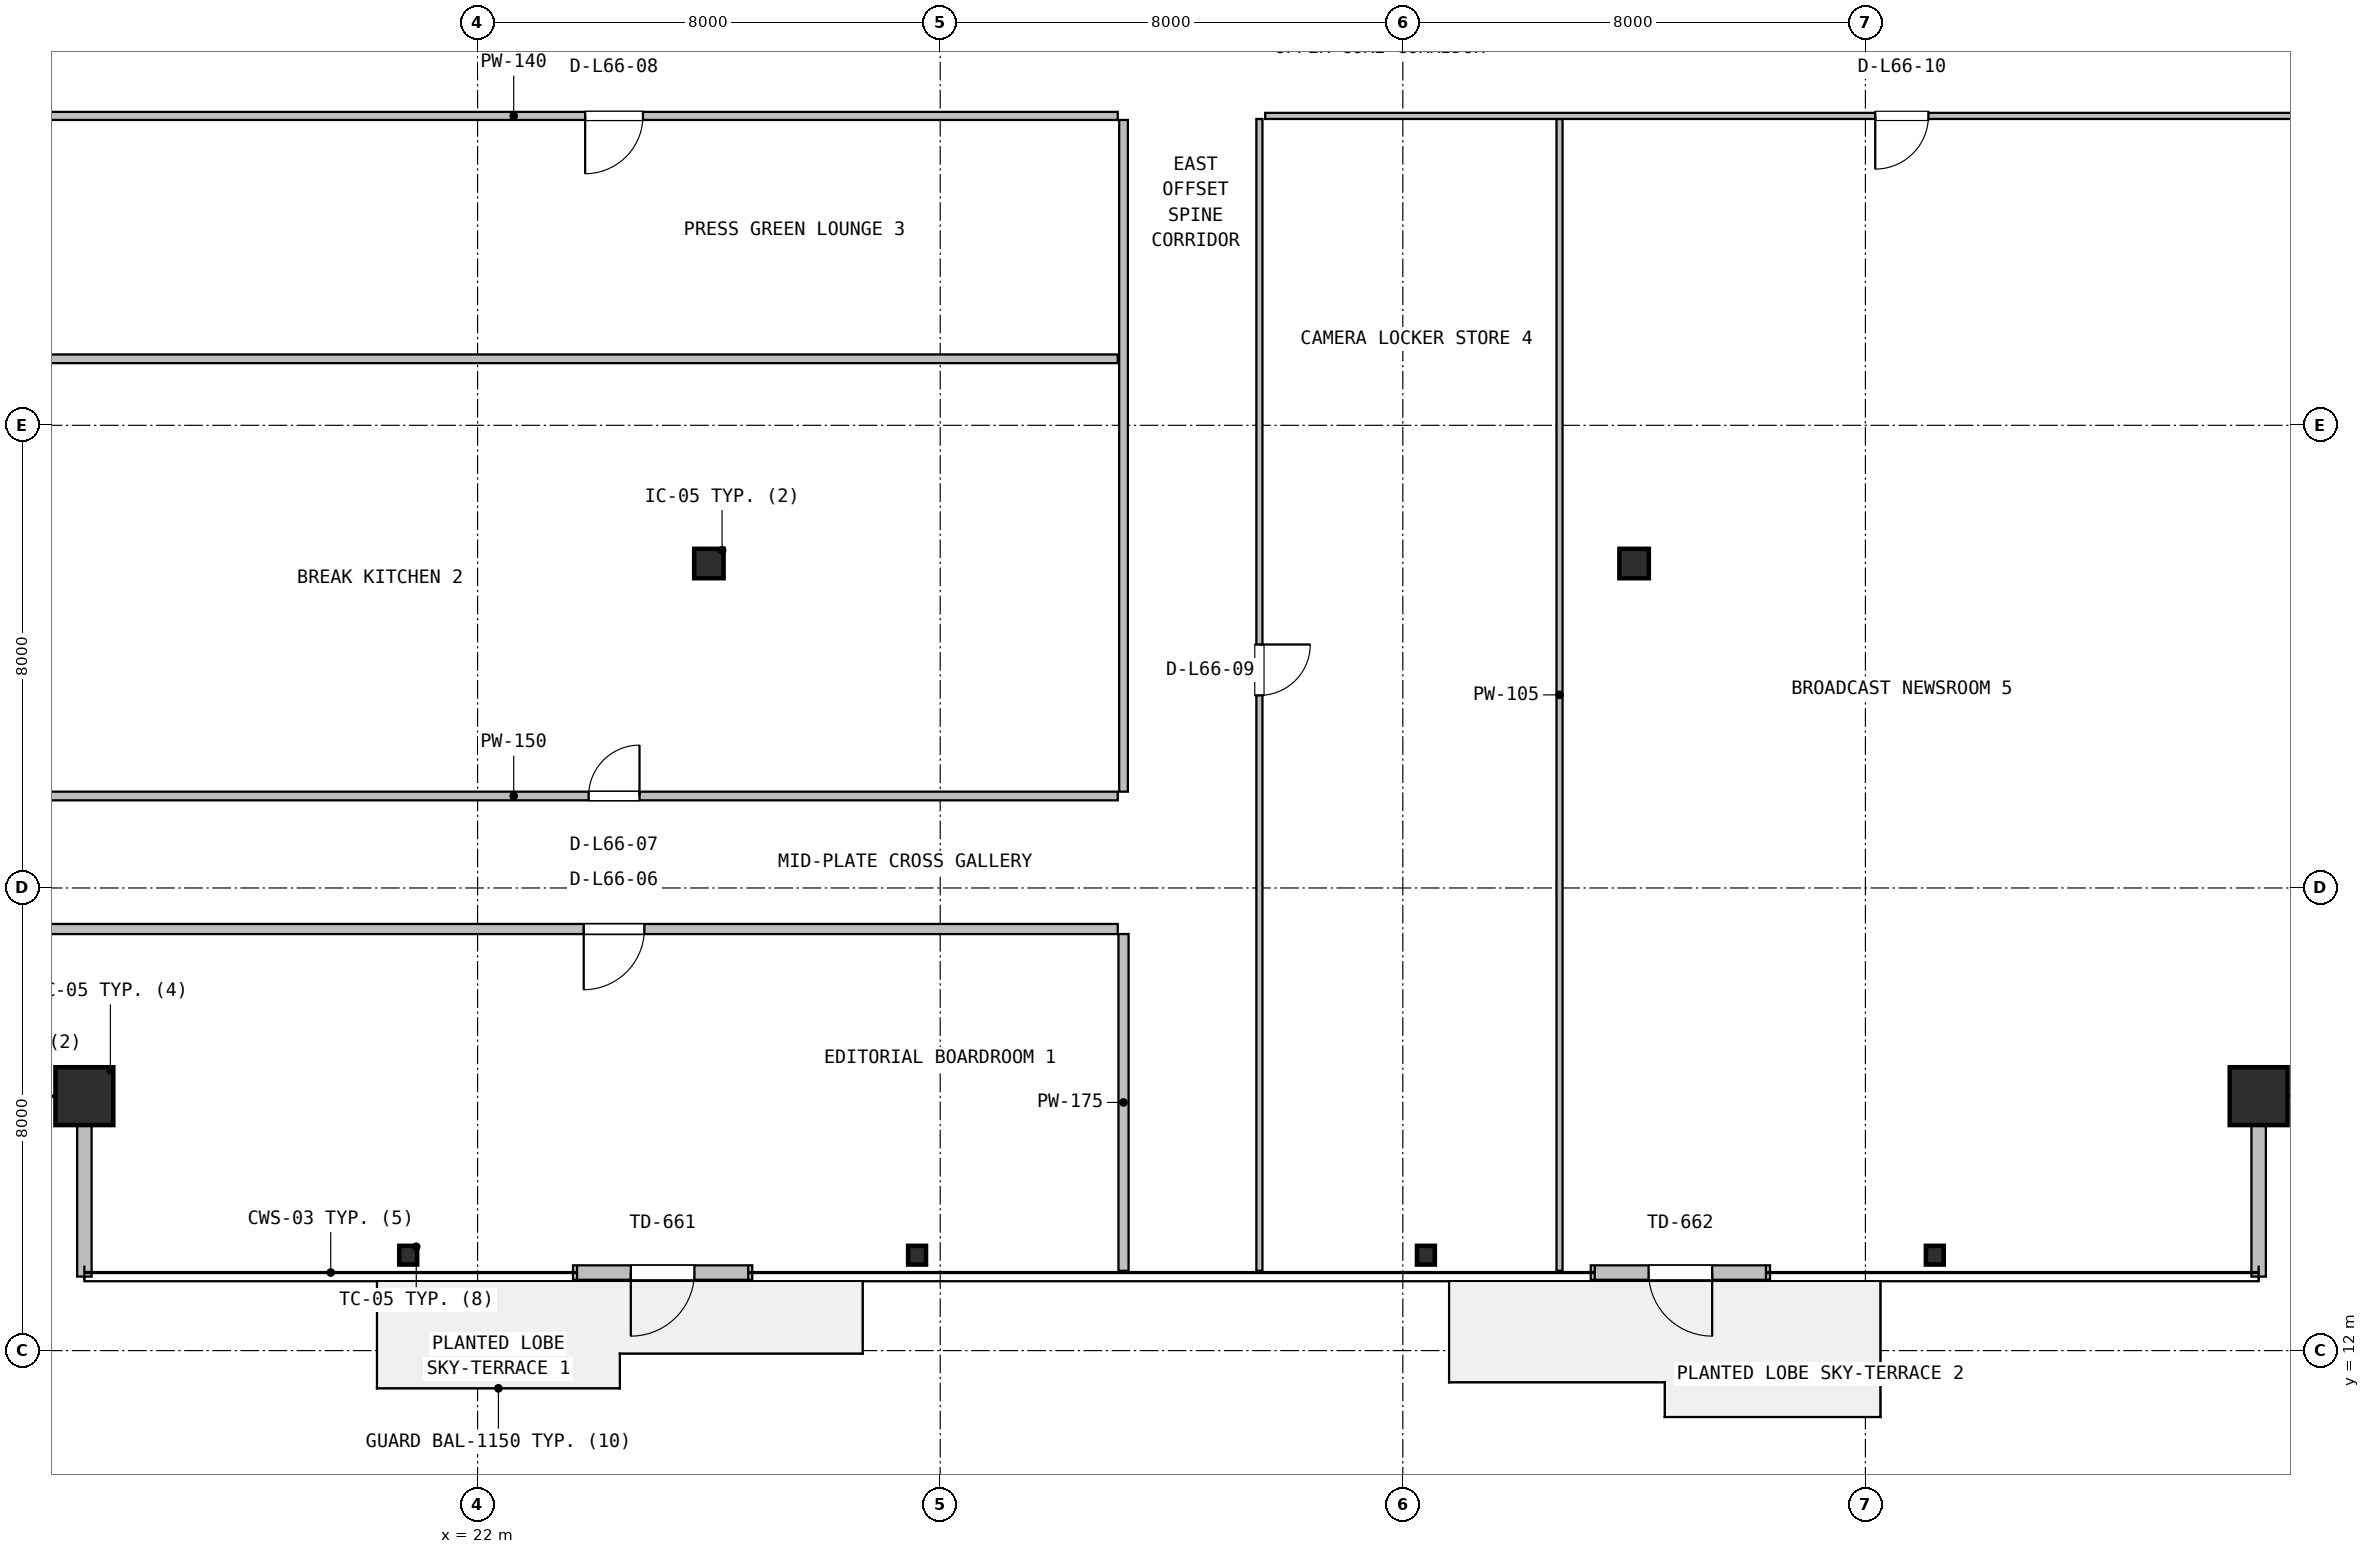
"""IFC4 building model, lengths in metres.
Left out: names, types, materials, properties, quantities, classifications, styles, units other than length and angle.
Written with IfcOpenShell. Run it as: python <this file> out.ifc"""

import sys

from ifc_helpers import new_model, si_unit, direction, frame, frame_2d, origin, origin_2d, place, context, subcontext, project, spatial, rectangle, hollow_rectangle, hollow_circle, i_section, extrude, source, transform, mapped, element, fill, save


model = new_model("IFC4")
c1 = context("Model", 3, precision=1e-05, world=origin(), true_north=direction((0.0, 1.0)))
c2 = subcontext(c1, "Body", "Model", "MODEL_VIEW")
j1 = project(units=[si_unit("LENGTHUNIT", "METRE"), si_unit("PLANEANGLEUNIT", "RADIAN")], contexts=[c1])
p1 = place(None, origin())
s1 = spatial("IfcSite", under=j1, at=p1, CompositionType="ELEMENT")
p2 = place(p1, origin())
s2 = spatial("IfcBuilding", under=s1, at=p2, CompositionType="ELEMENT")
p3 = place(p2, frame((0.0, 0.0, 266.0)))
s3 = spatial("IfcBuildingStorey", under=s2, at=p3, CompositionType="ELEMENT", Elevation=266.0)
m1 = source(origin(), c2, "Body", "SweptSolid", [
    extrude(hollow_rectangle(XDim=1.0, YDim=1.0, WallThickness=0.04, at=origin_2d()), origin(), (0.0, 0.0, 1.0), 3.8),
])
for number, where, z_axis, x_axis in (
    (1, (15.2, 16.4, 0.0), (0.0, 0.0, 1.0), (1.0, 0.0, 0.0)),
    (2, (52.8, 16.4, 0.0), (0.0, 0.0, 1.0), (1.0, 0.0, 0.0)),
):
    element("IfcColumn", number, at=place(p3, frame(where, z_axis=z_axis, x_axis=x_axis)), inside=s3, PredefinedType="COLUMN", context=c2, shape_type="MappedRepresentation", body=[
        mapped(m1, transform((0.0, 0.0, 0.0), x_axis=(1.0, 0.0, 0.0), y_axis=(0.0, 1.0, 0.0), z_axis=(0.0, 0.0, 1.0), scale=1.0)),
    ])
m2 = source(origin(), c2, "Body", "SweptSolid", [
    extrude(i_section(OverallWidth=0.309, OverallDepth=0.323, WebThickness=0.014, FlangeThickness=0.023, FilletRadius=0.015, at=origin_2d()), origin(), (0.0, 0.0, 1.0), 3.8),
])
for number, where, z_axis, x_axis in (
    (3, (20.8, 13.65, 0.0), (0.0, 0.0, 1.0), (1.0, 0.0, 0.0)),
    (4, (29.6, 13.65, 0.0), (0.0, 0.0, 1.0), (1.0, 0.0, 0.0)),
    (5, (38.4, 13.65, 0.0), (0.0, 0.0, 1.0), (1.0, 0.0, 0.0)),
    (6, (47.2, 13.65, 0.0), (0.0, 0.0, 1.0), (1.0, 0.0, 0.0)),
):
    element("IfcColumn", number, at=place(p3, frame(where, z_axis=z_axis, x_axis=x_axis)), inside=s3, PredefinedType="COLUMN", context=c2, shape_type="MappedRepresentation", body=[
        mapped(m2, transform((0.0, 0.0, 0.0), x_axis=(1.0, 0.0, 0.0), y_axis=(0.0, 1.0, 0.0), z_axis=(0.0, 0.0, 1.0), scale=1.0)),
    ])
m3 = source(origin(), c2, "Body", "SweptSolid", [
    extrude(hollow_circle(Radius=0.254, WallThickness=0.02, at=origin_2d()), origin(), (0.0, 0.0, 1.0), 3.8),
])
for number, where, z_axis, x_axis in (
    (7, (26.0, 25.61, 0.0), (0.0, 0.0, 1.0), (1.0, 0.0, 0.0)),
    (8, (42.0, 25.61, 0.0), (0.0, 0.0, 1.0), (1.0, 0.0, 0.0)),
):
    element("IfcColumn", number, at=place(p3, frame(where, z_axis=z_axis, x_axis=x_axis)), inside=s3, PredefinedType="COLUMN", context=c2, shape_type="MappedRepresentation", body=[
        mapped(m3, transform((0.0, 0.0, 0.0), x_axis=(1.0, 0.0, 0.0), y_axis=(0.0, 1.0, 0.0), z_axis=(0.0, 0.0, 1.0), scale=1.0)),
    ])
p4 = place(p3, frame((23.65, 13.35, 0.0), z_axis=(0.0, 0.0, 1.0), x_axis=(1.0, 0.0, 0.0)))
e9 = element("IfcWall", 9, at=p4, inside=s3, PredefinedType="SOLIDWALL", context=c2, shape_type="SweptSolid", body=[
    extrude(rectangle(XDim=3.1, YDim=0.25, at=frame_2d((1.55, 0.0))), origin(), (0.0, 0.0, 1.0), 3.53),
])
p5 = place(p4, frame((1.0, 0.0, 0.0)))
e10 = element("IfcOpeningElement", 10, at=p5, cuts=e9, PredefinedType="OPENING", context=c2, shape_type="SweptSolid", body=[
    extrude(rectangle(XDim=1.1, YDim=2.15, at=frame_2d((0.55, 1.075))), frame((0.0, 0.135, 0.0), z_axis=(0.0, -1.0, 0.0), x_axis=(1.0, 0.0, 0.0)), (0.0, 0.0, 1.0), 0.27),
])
p6 = place(p3, frame((41.25, 13.35, 0.0), z_axis=(0.0, 0.0, 1.0), x_axis=(1.0, 0.0, 0.0)))
e11 = element("IfcWall", 11, at=p6, inside=s3, PredefinedType="SOLIDWALL", context=c2, shape_type="SweptSolid", body=[
    extrude(rectangle(XDim=3.1, YDim=0.25, at=frame_2d((1.55, 0.0))), origin(), (0.0, 0.0, 1.0), 3.53),
])
p7 = place(p6, frame((1.0, 0.0, 0.0)))
e12 = element("IfcOpeningElement", 12, at=p7, cuts=e11, PredefinedType="OPENING", context=c2, shape_type="SweptSolid", body=[
    extrude(rectangle(XDim=1.1, YDim=2.15, at=frame_2d((0.55, 1.075))), frame((0.0, 0.135, 0.0), z_axis=(0.0, -1.0, 0.0), x_axis=(1.0, 0.0, 0.0)), (0.0, 0.0, 1.0), 0.27),
])
for number, where, z_axis, x_axis in (
    (13, (15.2, 13.28, 0.0), (0.0, 0.0, 1.0), (0.0, 1.0, 0.0)),
    (14, (52.8, 13.28, 0.0), (0.0, 0.0, 1.0), (0.0, 1.0, 0.0)),
):
    element("IfcWall", number, at=place(p3, frame(where, z_axis=z_axis, x_axis=x_axis)), inside=s3, PredefinedType="SOLIDWALL", context=c2, shape_type="SweptSolid", body=[
        extrude(rectangle(XDim=3.2, YDim=0.25, at=frame_2d((1.6, 0.0))), origin(), (0.0, 0.0, 1.0), 3.171),
    ])
p8 = place(p3, frame((33.17, 13.38, 0.0), z_axis=(0.0, 0.0, 1.0), x_axis=(0.0, 1.0, 0.0)))
e15 = element("IfcWall", 15, at=p8, inside=s3, PredefinedType="PARTITIONING", context=c2, shape_type="SweptSolid", body=[
    extrude(rectangle(XDim=5.823, YDim=0.175, at=frame_2d((2.912, 0.0))), origin(), (0.0, 0.0, 1.0), 3.171),
])
p9 = place(p3, frame((12.18, 19.29, 0.0), z_axis=(0.0, 0.0, 1.0), x_axis=(1.0, 0.0, 0.0)))
e16 = element("IfcWall", 16, at=p9, inside=s3, PredefinedType="PARTITIONING", context=c2, shape_type="SweptSolid", body=[
    extrude(rectangle(XDim=20.89, YDim=0.175, at=frame_2d((10.445, 0.0))), origin(), (0.0, 0.0, 1.0), 2.981),
])
p10 = place(p9, frame((11.655, 0.0, 0.0)))
e17 = element("IfcOpeningElement", 17, at=p10, cuts=e16, PredefinedType="OPENING", context=c2, shape_type="SweptSolid", body=[
    extrude(rectangle(XDim=1.05, YDim=2.1, at=frame_2d((0.525, 1.05))), frame((0.0, 0.098, 0.0), z_axis=(0.0, -1.0, 0.0), x_axis=(1.0, 0.0, 0.0)), (0.0, 0.0, 1.0), 0.195),
])
p11 = place(p3, frame((12.18, 21.59, 0.0), z_axis=(0.0, 0.0, 1.0), x_axis=(1.0, 0.0, 0.0)))
e18 = element("IfcWall", 18, at=p11, inside=s3, PredefinedType="PARTITIONING", context=c2, shape_type="SweptSolid", body=[
    extrude(rectangle(XDim=20.89, YDim=0.15, at=frame_2d((10.445, 0.0))), origin(), (0.0, 0.0, 1.0), 2.981),
])
p12 = place(p11, frame((11.74, 0.0, 0.0)))
e19 = element("IfcOpeningElement", 19, at=p12, cuts=e18, PredefinedType="OPENING", context=c2, shape_type="SweptSolid", body=[
    extrude(rectangle(XDim=0.88, YDim=2.06, at=frame_2d((0.44, 1.03))), frame((0.0, 0.085, 0.0), z_axis=(0.0, -1.0, 0.0), x_axis=(1.0, 0.0, 0.0)), (0.0, 0.0, 1.0), 0.17),
])
p13 = place(p3, frame((33.17, 21.665, 0.0), z_axis=(0.0, 0.0, 1.0), x_axis=(0.0, 1.0, 0.0)))
e20 = element("IfcWall", 20, at=p13, inside=s3, PredefinedType="PARTITIONING", context=c2, shape_type="SweptSolid", body=[
    extrude(rectangle(XDim=11.615, YDim=0.15, at=frame_2d((5.808, 0.0))), origin(), (0.0, 0.0, 1.0), 2.981),
])
p14 = place(p3, frame((12.18, 29.15, 0.0), z_axis=(0.0, 0.0, 1.0), x_axis=(1.0, 0.0, 0.0)))
e21 = element("IfcWall", 21, at=p14, inside=s3, PredefinedType="PARTITIONING", context=c2, shape_type="SweptSolid", body=[
    extrude(rectangle(XDim=20.89, YDim=0.15, at=frame_2d((10.445, 0.0))), origin(), (0.0, 0.0, 1.0), 2.981),
])
p15 = place(p3, frame((12.18, 33.35, 0.0), z_axis=(0.0, 0.0, 1.0), x_axis=(1.0, 0.0, 0.0)))
e22 = element("IfcWall", 22, at=p15, inside=s3, PredefinedType="PARTITIONING", context=c2, shape_type="SweptSolid", body=[
    extrude(rectangle(XDim=20.89, YDim=0.14, at=frame_2d((10.445, 0.0))), origin(), (0.0, 0.0, 1.0), 2.981),
])
p16 = place(p15, frame((11.68, 0.0, 0.0)))
e23 = element("IfcOpeningElement", 23, at=p16, cuts=e22, PredefinedType="OPENING", context=c2, shape_type="SweptSolid", body=[
    extrude(rectangle(XDim=1.0, YDim=2.1, at=frame_2d((0.5, 1.05))), frame((0.0, 0.08, 0.0), z_axis=(0.0, -1.0, 0.0), x_axis=(1.0, 0.0, 0.0)), (0.0, 0.0, 1.0), 0.16),
])
p17 = place(p3, frame((40.71, 13.38, 0.0), z_axis=(0.0, 0.0, 1.0), x_axis=(0.0, 1.0, 0.0)))
e24 = element("IfcWall", 24, at=p17, inside=s3, PredefinedType="PARTITIONING", context=c2, shape_type="SweptSolid", body=[
    extrude(rectangle(XDim=19.917, YDim=0.105, at=frame_2d((9.958, 0.0))), origin(), (0.0, 0.0, 1.0), 2.981),
])
p18 = place(p3, frame((35.62, 33.35, 0.0), z_axis=(0.0, 0.0, 1.0), x_axis=(1.0, 0.0, 0.0)))
e25 = element("IfcWall", 25, at=p18, inside=s3, PredefinedType="PARTITIONING", context=c2, shape_type="SweptSolid", body=[
    extrude(rectangle(XDim=20.2, YDim=0.105, at=frame_2d((10.1, 0.0))), origin(), (0.0, 0.0, 1.0), 2.981),
])
p19 = place(p18, frame((10.55, 0.0, 0.0)))
e26 = element("IfcOpeningElement", 26, at=p19, cuts=e25, PredefinedType="OPENING", context=c2, shape_type="SweptSolid", body=[
    extrude(rectangle(XDim=0.92, YDim=2.08, at=frame_2d((0.46, 1.04))), frame((0.0, 0.062, 0.0), z_axis=(0.0, -1.0, 0.0), x_axis=(1.0, 0.0, 0.0)), (0.0, 0.0, 1.0), 0.125),
])
p20 = place(p3, frame((35.52, 13.38, 0.0), z_axis=(0.0, 0.0, 1.0), x_axis=(0.0, 1.0, 0.0)))
e27 = element("IfcWall", 27, at=p20, inside=s3, PredefinedType="PARTITIONING", context=c2, shape_type="SweptSolid", body=[
    extrude(rectangle(XDim=19.917, YDim=0.105, at=frame_2d((9.958, 0.0))), origin(), (0.0, 0.0, 1.0), 2.981),
])
p21 = place(p20, frame((9.95, 0.0, 0.0)))
e28 = element("IfcOpeningElement", 28, at=p21, cuts=e27, PredefinedType="OPENING", context=c2, shape_type="SweptSolid", body=[
    extrude(rectangle(XDim=0.88, YDim=2.06, at=frame_2d((0.44, 1.03))), frame((0.0, 0.062, 0.0), z_axis=(0.0, -1.0, 0.0), x_axis=(1.0, 0.0, 0.0)), (0.0, 0.0, 1.0), 0.125),
])
m4 = source(origin(), c2, "Body", "SweptSolid", [
    extrude(rectangle(XDim=1.1, YDim=2.15, at=frame_2d((0.55, 1.075))), frame((0.0, 0.025, 0.0), z_axis=(0.0, -1.0, 0.0), x_axis=(1.0, 0.0, 0.0)), (0.0, 0.0, 1.0), 0.05),
])
p22 = place(p5, frame((1.1, 0.0, 0.0), z_axis=(0.0, 0.0, 1.0), x_axis=(-1.0, 0.0, 0.0)))
e29 = element("IfcDoor", 29, at=p22, inside=s3, OperationType="SINGLE_SWING_LEFT", PredefinedType="DOOR", context=c2, shape_type="MappedRepresentation", body=[
    mapped(m4, transform((0.0, 0.0, 0.0), x_axis=(1.0, 0.0, 0.0), y_axis=(0.0, 1.0, 0.0), z_axis=(0.0, 0.0, 1.0), scale=1.0)),
])
fill(e10, e29)
p23 = place(p7, frame((1.1, 0.0, 0.0), z_axis=(0.0, 0.0, 1.0), x_axis=(-1.0, 0.0, 0.0)))
e30 = element("IfcDoor", 30, at=p23, inside=s3, OperationType="SINGLE_SWING_RIGHT", PredefinedType="DOOR", context=c2, shape_type="MappedRepresentation", body=[
    mapped(m4, transform((0.0, 0.0, 0.0), x_axis=(1.0, 0.0, 0.0), y_axis=(0.0, 1.0, 0.0), z_axis=(0.0, 0.0, 1.0), scale=1.0)),
])
fill(e12, e30)
m5 = source(origin(), c2, "Body", "SweptSolid", [
    extrude(rectangle(XDim=1.05, YDim=2.1, at=frame_2d((0.525, 1.05))), frame((0.0, 0.025, 0.0), z_axis=(0.0, -1.0, 0.0), x_axis=(1.0, 0.0, 0.0)), (0.0, 0.0, 1.0), 0.05),
])
p24 = place(p10, frame((1.05, 0.0, 0.0), z_axis=(0.0, 0.0, 1.0), x_axis=(-1.0, 0.0, 0.0)))
e31 = element("IfcDoor", 31, at=p24, inside=s3, OperationType="SINGLE_SWING_LEFT", PredefinedType="DOOR", context=c2, shape_type="MappedRepresentation", body=[
    mapped(m5, transform((0.0, 0.0, 0.0), x_axis=(1.0, 0.0, 0.0), y_axis=(0.0, 1.0, 0.0), z_axis=(0.0, 0.0, 1.0), scale=1.0)),
])
fill(e17, e31)
m6 = source(origin(), c2, "Body", "SweptSolid", [
    extrude(rectangle(XDim=0.88, YDim=2.06, at=frame_2d((0.44, 1.03))), frame((0.0, 0.025, 0.0), z_axis=(0.0, -1.0, 0.0), x_axis=(1.0, 0.0, 0.0)), (0.0, 0.0, 1.0), 0.05),
])
p25 = place(p12, origin())
e32 = element("IfcDoor", 32, at=p25, inside=s3, OperationType="SINGLE_SWING_RIGHT", PredefinedType="DOOR", context=c2, shape_type="MappedRepresentation", body=[
    mapped(m6, transform((0.0, 0.0, 0.0), x_axis=(1.0, 0.0, 0.0), y_axis=(0.0, 1.0, 0.0), z_axis=(0.0, 0.0, 1.0), scale=1.0)),
])
fill(e19, e32)
m7 = source(origin(), c2, "Body", "SweptSolid", [
    extrude(rectangle(XDim=1.0, YDim=2.1, at=frame_2d((0.5, 1.05))), frame((0.0, 0.025, 0.0), z_axis=(0.0, -1.0, 0.0), x_axis=(1.0, 0.0, 0.0)), (0.0, 0.0, 1.0), 0.05),
])
p26 = place(p16, frame((1.0, 0.0, 0.0), z_axis=(0.0, 0.0, 1.0), x_axis=(-1.0, 0.0, 0.0)))
e33 = element("IfcDoor", 33, at=p26, inside=s3, OperationType="SINGLE_SWING_LEFT", PredefinedType="DOOR", context=c2, shape_type="MappedRepresentation", body=[
    mapped(m7, transform((0.0, 0.0, 0.0), x_axis=(1.0, 0.0, 0.0), y_axis=(0.0, 1.0, 0.0), z_axis=(0.0, 0.0, 1.0), scale=1.0)),
])
fill(e23, e33)
p27 = place(p21, frame((0.88, 0.0, 0.0), z_axis=(0.0, 0.0, 1.0), x_axis=(-1.0, 0.0, 0.0)))
e34 = element("IfcDoor", 34, at=p27, inside=s3, OperationType="SINGLE_SWING_RIGHT", PredefinedType="DOOR", context=c2, shape_type="MappedRepresentation", body=[
    mapped(m6, transform((0.0, 0.0, 0.0), x_axis=(1.0, 0.0, 0.0), y_axis=(0.0, 1.0, 0.0), z_axis=(0.0, 0.0, 1.0), scale=1.0)),
])
fill(e28, e34)
m8 = source(origin(), c2, "Body", "SweptSolid", [
    extrude(rectangle(XDim=0.92, YDim=2.08, at=frame_2d((0.46, 1.04))), frame((0.0, 0.025, 0.0), z_axis=(0.0, -1.0, 0.0), x_axis=(1.0, 0.0, 0.0)), (0.0, 0.0, 1.0), 0.05),
])
p28 = place(p19, frame((0.92, 0.0, 0.0), z_axis=(0.0, 0.0, 1.0), x_axis=(-1.0, 0.0, 0.0)))
e35 = element("IfcDoor", 35, at=p28, inside=s3, OperationType="SINGLE_SWING_LEFT", PredefinedType="DOOR", context=c2, shape_type="MappedRepresentation", body=[
    mapped(m8, transform((0.0, 0.0, 0.0), x_axis=(1.0, 0.0, 0.0), y_axis=(0.0, 1.0, 0.0), z_axis=(0.0, 0.0, 1.0), scale=1.0)),
])
fill(e26, e35)
save(model, sys.argv[1])
